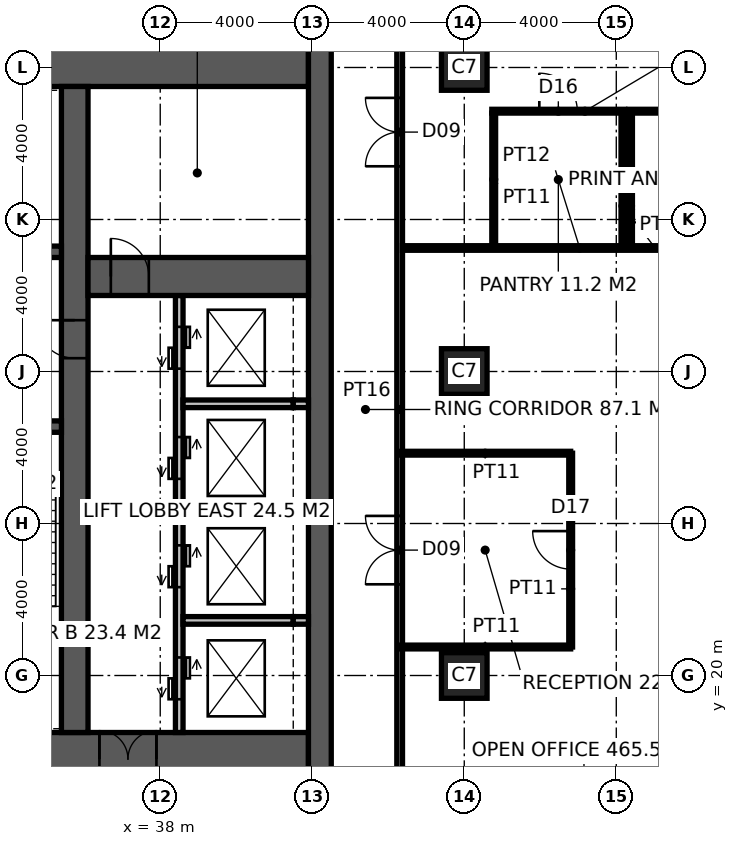
"""IFC4 building model, lengths in metres.
Left out: names, types, materials, properties, quantities, classifications, styles, units other than length and angle.
Written with IfcOpenShell. Run it as: python <this file> out.ifc"""

import sys

from ifc_helpers import new_model, si_unit, direction, frame, frame_2d, origin, origin_2d, place, context, subcontext, project, spatial, rectangle, hollow_rectangle, extrude, element, fill, save


model = new_model("IFC4")
c1 = context("Model", 3, precision=1e-05, world=origin(), true_north=direction((0.0, 1.0)))
c2 = subcontext(c1, "Body", "Model", "MODEL_VIEW")
j1 = project(units=[si_unit("LENGTHUNIT", "METRE"), si_unit("PLANEANGLEUNIT", "RADIAN")], contexts=[c1])
p1 = place(None, origin())
s1 = spatial("IfcSite", under=j1, at=p1, CompositionType="ELEMENT")
p2 = place(p1, origin())
s2 = spatial("IfcBuilding", under=s1, at=p2, CompositionType="ELEMENT")
p3 = place(p2, frame((0.0, 0.0, 47.0)))
s3 = spatial("IfcBuildingStorey", under=s2, at=p3, CompositionType="ELEMENT", Elevation=47.0)
for number, where, z_axis, x_axis in (
    (1, (46.0, 20.0, 0.0), (0.0, 0.0, 1.0), (1.0, 0.0, 0.0)),
    (2, (46.0, 28.0, 0.0), (0.0, 0.0, 1.0), (1.0, 0.0, 0.0)),
    (3, (46.0, 36.0, 0.0), (0.0, 0.0, 1.0), (1.0, 0.0, 0.0)),
):
    element("IfcColumn", number, at=place(p3, frame(where, z_axis=z_axis, x_axis=x_axis)), inside=s3, PredefinedType="COLUMN", context=c2, shape_type="SweptSolid", body=[
        extrude(hollow_rectangle(XDim=1.2, YDim=1.2, WallThickness=0.1, at=origin_2d()), origin(), (0.0, 0.0, 1.0), 4.0),
    ])
p4 = place(p3, frame((18.5, 17.8, -0.15), z_axis=(0.0, 0.0, 1.0), x_axis=(1.0, 0.0, 0.0)))
e4 = element("IfcWall", 4, at=p4, inside=s3, PredefinedType="SHEAR", context=c2, shape_type="SweptSolid", body=[
    extrude(rectangle(XDim=23.4, YDim=1.4, at=frame_2d((11.7, 0.0))), origin(), (0.0, 0.0, 1.0), 4.0),
])
p5 = place(p4, frame((3.45, 0.0, 0.15)))
e5 = element("IfcOpeningElement", 5, at=p5, cuts=e4, PredefinedType="OPENING", context=c2, shape_type="SweptSolid", body=[
    extrude(rectangle(XDim=1.5, YDim=2.4, at=frame_2d((0.75, 1.2))), frame((0.0, 0.71, 0.0), z_axis=(0.0, -1.0, 0.0), x_axis=(1.0, 0.0, 0.0)), (0.0, 0.0, 1.0), 1.42),
])
p6 = place(p4, frame((17.9, 0.0, 0.15)))
e6 = element("IfcOpeningElement", 6, at=p6, cuts=e4, PredefinedType="OPENING", context=c2, shape_type="SweptSolid", body=[
    extrude(rectangle(XDim=1.5, YDim=2.4, at=frame_2d((0.75, 1.2))), frame((0.0, 0.71, 0.0), z_axis=(0.0, -1.0, 0.0), x_axis=(1.0, 0.0, 0.0)), (0.0, 0.0, 1.0), 1.42),
])
p7 = place(p4, frame((0.9, 0.0, 0.15)))
e7 = element("IfcOpeningElement", 7, at=p7, cuts=e4, PredefinedType="OPENING", context=c2, shape_type="SweptSolid", body=[
    extrude(rectangle(XDim=1.0, YDim=2.2, at=frame_2d((0.5, 1.1))), frame((0.0, 0.71, 0.0), z_axis=(0.0, -1.0, 0.0), x_axis=(1.0, 0.0, 0.0)), (0.0, 0.0, 1.0), 1.42),
])
p8 = place(p3, frame((18.5, 36.2, -0.15), z_axis=(0.0, 0.0, 1.0), x_axis=(1.0, 0.0, 0.0)))
e8 = element("IfcWall", 8, at=p8, inside=s3, PredefinedType="SHEAR", context=c2, shape_type="SweptSolid", body=[
    extrude(rectangle(XDim=23.4, YDim=1.4, at=frame_2d((11.7, 0.0))), origin(), (0.0, 0.0, 1.0), 4.0),
])
p9 = place(p3, frame((42.2, 17.1, -0.15), z_axis=(0.0, 0.0, 1.0), x_axis=(0.0, 1.0, 0.0)))
e9 = element("IfcWall", 9, at=p9, inside=s3, PredefinedType="SHEAR", context=c2, shape_type="SweptSolid", body=[
    extrude(rectangle(XDim=19.8, YDim=0.6, at=frame_2d((9.9, 0.0))), origin(), (0.0, 0.0, 1.0), 4.0),
])
p10 = place(p3, frame((35.75, 18.5, -0.15), z_axis=(0.0, 0.0, 1.0), x_axis=(0.0, 1.0, 0.0)))
e10 = element("IfcWall", 10, at=p10, inside=s3, PredefinedType="SHEAR", context=c2, shape_type="SweptSolid", body=[
    extrude(rectangle(XDim=17.0, YDim=0.7, at=frame_2d((8.5, 0.0))), origin(), (0.0, 0.0, 1.0), 4.0),
])
p11 = place(p10, frame((9.85, 0.0, 0.15)))
e11 = element("IfcOpeningElement", 11, at=p11, cuts=e10, PredefinedType="OPENING", context=c2, shape_type="SweptSolid", body=[
    extrude(rectangle(XDim=1.0, YDim=2.2, at=frame_2d((0.5, 1.1))), frame((0.0, 0.36, 0.0), z_axis=(0.0, -1.0, 0.0), x_axis=(1.0, 0.0, 0.0)), (0.0, 0.0, 1.0), 0.72),
])
p12 = place(p3, frame((24.15, 26.55, -0.15), z_axis=(0.0, 0.0, 1.0), x_axis=(1.0, 0.0, 0.0)))
e12 = element("IfcWall", 12, at=p12, inside=s3, PredefinedType="SHEAR", context=c2, shape_type="SweptSolid", body=[
    extrude(rectangle(XDim=11.25, YDim=0.3, at=frame_2d((5.625, 0.0))), origin(), (0.0, 0.0, 1.0), 4.0),
])
p13 = place(p12, frame((9.25, 0.0, 0.15)))
e13 = element("IfcOpeningElement", 13, at=p13, cuts=e12, PredefinedType="OPENING", context=c2, shape_type="SweptSolid", body=[
    extrude(rectangle(XDim=1.0, YDim=2.2, at=frame_2d((0.5, 1.1))), frame((0.0, 0.16, 0.0), z_axis=(0.0, -1.0, 0.0), x_axis=(1.0, 0.0, 0.0)), (0.0, 0.0, 1.0), 0.32),
])
p14 = place(p12, frame((4.9, 0.0, 0.15)))
e14 = element("IfcOpeningElement", 14, at=p14, cuts=e12, PredefinedType="OPENING", context=c2, shape_type="SweptSolid", body=[
    extrude(rectangle(XDim=1.5, YDim=2.4, at=frame_2d((0.75, 1.2))), frame((0.0, 0.16, 0.0), z_axis=(0.0, -1.0, 0.0), x_axis=(1.0, 0.0, 0.0)), (0.0, 0.0, 1.0), 0.32),
])
p15 = place(p3, frame((24.15, 31.15, -0.15), z_axis=(0.0, 0.0, 1.0), x_axis=(1.0, 0.0, 0.0)))
e15 = element("IfcWall", 15, at=p15, inside=s3, PredefinedType="SHEAR", context=c2, shape_type="SweptSolid", body=[
    extrude(rectangle(XDim=11.25, YDim=0.3, at=frame_2d((5.625, 0.0))), origin(), (0.0, 0.0, 1.0), 4.0),
])
p16 = place(p15, frame((7.25, 0.0, 0.15)))
e16 = element("IfcOpeningElement", 16, at=p16, cuts=e15, PredefinedType="OPENING", context=c2, shape_type="SweptSolid", body=[
    extrude(rectangle(XDim=1.4, YDim=2.4, at=frame_2d((0.7, 1.2))), frame((0.0, 0.16, 0.0), z_axis=(0.0, -1.0, 0.0), x_axis=(1.0, 0.0, 0.0)), (0.0, 0.0, 1.0), 0.32),
])
p17 = place(p3, frame((38.5, 18.5, -0.15), z_axis=(0.0, 0.0, 1.0), x_axis=(0.0, 1.0, 0.0)))
e17 = element("IfcWall", 17, at=p17, inside=s3, PredefinedType="SOLIDWALL", context=c2, shape_type="SweptSolid", body=[
    extrude(rectangle(XDim=11.5, YDim=0.2, at=frame_2d((5.75, 0.0))), origin(), (0.0, 0.0, 1.0), 4.0),
])
p18 = place(p17, frame((0.875, 0.0, 0.15)))
e18 = element("IfcOpeningElement", 18, at=p18, cuts=e17, PredefinedType="OPENING", context=c2, shape_type="SweptSolid", body=[
    extrude(rectangle(XDim=1.1, YDim=2.2, at=frame_2d((0.55, 1.1))), frame((0.0, 0.11, 0.0), z_axis=(0.0, -1.0, 0.0), x_axis=(1.0, 0.0, 0.0)), (0.0, 0.0, 1.0), 0.22),
])
p19 = place(p17, frame((3.825, 0.0, 0.15)))
e19 = element("IfcOpeningElement", 19, at=p19, cuts=e17, PredefinedType="OPENING", context=c2, shape_type="SweptSolid", body=[
    extrude(rectangle(XDim=1.1, YDim=2.2, at=frame_2d((0.55, 1.1))), frame((0.0, 0.11, 0.0), z_axis=(0.0, -1.0, 0.0), x_axis=(1.0, 0.0, 0.0)), (0.0, 0.0, 1.0), 0.22),
])
p20 = place(p17, frame((6.675, 0.0, 0.15)))
e20 = element("IfcOpeningElement", 20, at=p20, cuts=e17, PredefinedType="OPENING", context=c2, shape_type="SweptSolid", body=[
    extrude(rectangle(XDim=1.1, YDim=2.2, at=frame_2d((0.55, 1.1))), frame((0.0, 0.11, 0.0), z_axis=(0.0, -1.0, 0.0), x_axis=(1.0, 0.0, 0.0)), (0.0, 0.0, 1.0), 0.22),
])
p21 = place(p17, frame((9.575, 0.0, 0.15)))
e21 = element("IfcOpeningElement", 21, at=p21, cuts=e17, PredefinedType="OPENING", context=c2, shape_type="SweptSolid", body=[
    extrude(rectangle(XDim=1.1, YDim=2.2, at=frame_2d((0.55, 1.1))), frame((0.0, 0.11, 0.0), z_axis=(0.0, -1.0, 0.0), x_axis=(1.0, 0.0, 0.0)), (0.0, 0.0, 1.0), 0.22),
])
p22 = place(p3, frame((36.1, 30.5, -0.15), z_axis=(0.0, 0.0, 1.0), x_axis=(1.0, 0.0, 0.0)))
e22 = element("IfcWall", 22, at=p22, inside=s3, PredefinedType="SHEAR", context=c2, shape_type="SweptSolid", body=[
    extrude(rectangle(XDim=5.8, YDim=1.0, at=frame_2d((2.9, 0.0))), origin(), (0.0, 0.0, 1.0), 4.0),
])
p23 = place(p22, frame((0.6, 0.0, 0.15)))
e23 = element("IfcOpeningElement", 23, at=p23, cuts=e22, PredefinedType="OPENING", context=c2, shape_type="SweptSolid", body=[
    extrude(rectangle(XDim=1.0, YDim=2.2, at=frame_2d((0.5, 1.1))), frame((0.0, 0.51, 0.0), z_axis=(0.0, -1.0, 0.0), x_axis=(1.0, 0.0, 0.0)), (0.0, 0.0, 1.0), 1.02),
])
p24 = place(p3, frame((38.6, 21.45, -0.15), z_axis=(0.0, 0.0, 1.0), x_axis=(1.0, 0.0, 0.0)))
e24 = element("IfcWall", 24, at=p24, inside=s3, PredefinedType="SOLIDWALL", context=c2, shape_type="SweptSolid", body=[
    extrude(rectangle(XDim=2.9, YDim=0.2, at=frame_2d((1.45, 0.0))), origin(), (0.0, 0.0, 1.0), 4.0),
])
p25 = place(p3, frame((41.5, 21.45, -0.15), z_axis=(0.0, 0.0, 1.0), x_axis=(1.0, 0.0, 0.0)))
e25 = element("IfcWall", 25, at=p25, inside=s3, PredefinedType="SOLIDWALL", context=c2, shape_type="SweptSolid", body=[
    extrude(rectangle(XDim=0.4, YDim=0.2, at=frame_2d((0.2, 0.0))), origin(), (0.0, 0.0, 1.0), 4.0),
])
p26 = place(p3, frame((38.6, 24.3, -0.15), z_axis=(0.0, 0.0, 1.0), x_axis=(1.0, 0.0, 0.0)))
e26 = element("IfcWall", 26, at=p26, inside=s3, PredefinedType="SOLIDWALL", context=c2, shape_type="SweptSolid", body=[
    extrude(rectangle(XDim=2.9, YDim=0.2, at=frame_2d((1.45, 0.0))), origin(), (0.0, 0.0, 1.0), 4.0),
])
p27 = place(p3, frame((41.5, 24.3, -0.15), z_axis=(0.0, 0.0, 1.0), x_axis=(1.0, 0.0, 0.0)))
e27 = element("IfcWall", 27, at=p27, inside=s3, PredefinedType="SOLIDWALL", context=c2, shape_type="SweptSolid", body=[
    extrude(rectangle(XDim=0.4, YDim=0.2, at=frame_2d((0.2, 0.0))), origin(), (0.0, 0.0, 1.0), 4.0),
])
p28 = place(p3, frame((38.6, 27.15, -0.15), z_axis=(0.0, 0.0, 1.0), x_axis=(1.0, 0.0, 0.0)))
e28 = element("IfcWall", 28, at=p28, inside=s3, PredefinedType="SOLIDWALL", context=c2, shape_type="SweptSolid", body=[
    extrude(rectangle(XDim=2.9, YDim=0.2, at=frame_2d((1.45, 0.0))), origin(), (0.0, 0.0, 1.0), 4.0),
])
p29 = place(p3, frame((41.5, 27.15, -0.15), z_axis=(0.0, 0.0, 1.0), x_axis=(1.0, 0.0, 0.0)))
e29 = element("IfcWall", 29, at=p29, inside=s3, PredefinedType="SOLIDWALL", context=c2, shape_type="SweptSolid", body=[
    extrude(rectangle(XDim=0.4, YDim=0.2, at=frame_2d((0.2, 0.0))), origin(), (0.0, 0.0, 1.0), 4.0),
])
p30 = place(p3, frame((44.3, 15.225, 0.0), z_axis=(0.0, 0.0, 1.0), x_axis=(0.0, 1.0, 0.0)))
e30 = element("IfcWall", 30, at=p30, inside=s3, PredefinedType="PARTITIONING", context=c2, shape_type="SweptSolid", body=[
    extrude(rectangle(XDim=23.55, YDim=0.15, at=frame_2d((11.775, 0.0))), origin(), (0.0, 0.0, 1.0), 3.85),
])
p31 = place(p30, frame((7.175, 0.0, 0.0)))
e31 = element("IfcOpeningElement", 31, at=p31, cuts=e30, PredefinedType="OPENING", context=c2, shape_type="SweptSolid", body=[
    extrude(rectangle(XDim=1.8, YDim=2.4, at=frame_2d((0.9, 1.2))), frame((0.0, 0.085, 0.0), z_axis=(0.0, -1.0, 0.0), x_axis=(1.0, 0.0, 0.0)), (0.0, 0.0, 1.0), 0.17),
])
p32 = place(p30, frame((18.175, 0.0, 0.0)))
e32 = element("IfcOpeningElement", 32, at=p32, cuts=e30, PredefinedType="OPENING", context=c2, shape_type="SweptSolid", body=[
    extrude(rectangle(XDim=1.8, YDim=2.4, at=frame_2d((0.9, 1.2))), frame((0.0, 0.085, 0.0), z_axis=(0.0, -1.0, 0.0), x_axis=(1.0, 0.0, 0.0)), (0.0, 0.0, 1.0), 0.17),
])
p33 = place(p3, frame((44.375, 31.25, 0.0), z_axis=(0.0, 0.0, 1.0), x_axis=(1.0, 0.0, 0.0)))
e33 = element("IfcWall", 33, at=p33, inside=s3, PredefinedType="PARTITIONING", context=c2, shape_type="SweptSolid", body=[
    extrude(rectangle(XDim=9.325, YDim=0.12, at=frame_2d((4.663, 0.0))), origin(), (0.0, 0.0, 1.0), 3.85),
])
p34 = place(p3, frame((46.725, 34.85, 0.0), z_axis=(0.0, 0.0, 1.0), x_axis=(1.0, 0.0, 0.0)))
e34 = element("IfcWall", 34, at=p34, inside=s3, PredefinedType="PARTITIONING", context=c2, shape_type="SweptSolid", body=[
    extrude(rectangle(XDim=3.5, YDim=0.1, at=frame_2d((1.75, 0.0))), origin(), (0.0, 0.0, 1.0), 3.85),
])
p35 = place(p34, frame((1.25, 0.0, 0.0)))
e35 = element("IfcOpeningElement", 35, at=p35, cuts=e34, PredefinedType="OPENING", context=c2, shape_type="SweptSolid", body=[
    extrude(rectangle(XDim=1.0, YDim=2.2, at=frame_2d((0.5, 1.1))), frame((0.0, 0.06, 0.0), z_axis=(0.0, -1.0, 0.0), x_axis=(1.0, 0.0, 0.0)), (0.0, 0.0, 1.0), 0.12),
])
p36 = place(p3, frame((50.325, 34.85, 0.0), z_axis=(0.0, 0.0, 1.0), x_axis=(1.0, 0.0, 0.0)))
e36 = element("IfcWall", 36, at=p36, inside=s3, PredefinedType="PARTITIONING", context=c2, shape_type="SweptSolid", body=[
    extrude(rectangle(XDim=2.75, YDim=0.1, at=frame_2d((1.375, 0.0))), origin(), (0.0, 0.0, 1.0), 3.85),
])
p37 = place(p36, frame((0.875, 0.0, 0.0)))
e37 = element("IfcOpeningElement", 37, at=p37, cuts=e36, PredefinedType="OPENING", context=c2, shape_type="SweptSolid", body=[
    extrude(rectangle(XDim=1.0, YDim=2.2, at=frame_2d((0.5, 1.1))), frame((0.0, 0.06, 0.0), z_axis=(0.0, -1.0, 0.0), x_axis=(1.0, 0.0, 0.0)), (0.0, 0.0, 1.0), 0.12),
])
for number, where, z_axis, x_axis in (
    (38, (46.775, 31.31, 0.0), (0.0, 0.0, 1.0), (0.0, 1.0, 0.0)),
    (39, (50.175, 31.31, 0.0), (0.0, 0.0, 1.0), (0.0, 1.0, 0.0)),
    (40, (50.375, 31.31, 0.0), (0.0, 0.0, 1.0), (0.0, 1.0, 0.0)),
):
    element("IfcWall", number, at=place(p3, frame(where, z_axis=z_axis, x_axis=x_axis)), inside=s3, PredefinedType="PARTITIONING", context=c2, shape_type="SweptSolid", body=[
        extrude(rectangle(XDim=3.49, YDim=0.1, at=frame_2d((1.745, 0.0))), origin(), (0.0, 0.0, 1.0), 3.85),
    ])
p38 = place(p3, frame((44.3, 20.75, 0.0), z_axis=(0.0, 0.0, 1.0), x_axis=(1.0, 0.0, 0.0)))
e41 = element("IfcWall", 41, at=p38, inside=s3, PredefinedType="PARTITIONING", context=c2, shape_type="SweptSolid", body=[
    extrude(rectangle(XDim=4.5, YDim=0.1, at=frame_2d((2.25, 0.0))), origin(), (0.0, 0.0, 1.0), 3.85),
])
p39 = place(p3, frame((48.8, 20.75, 0.0), z_axis=(0.0, 0.0, 1.0), x_axis=(0.0, 1.0, 0.0)))
e42 = element("IfcWall", 42, at=p39, inside=s3, PredefinedType="PARTITIONING", context=c2, shape_type="SweptSolid", body=[
    extrude(rectangle(XDim=5.1, YDim=0.1, at=frame_2d((2.55, 0.0))), origin(), (0.0, 0.0, 1.0), 3.85),
])
p40 = place(p39, frame((2.05, 0.0, 0.0)))
e43 = element("IfcOpeningElement", 43, at=p40, cuts=e42, PredefinedType="OPENING", context=c2, shape_type="SweptSolid", body=[
    extrude(rectangle(XDim=1.0, YDim=2.2, at=frame_2d((0.5, 1.1))), frame((0.0, 0.06, 0.0), z_axis=(0.0, -1.0, 0.0), x_axis=(1.0, 0.0, 0.0)), (0.0, 0.0, 1.0), 0.12),
])
p41 = place(p3, frame((48.8, 25.85, 0.0), z_axis=(0.0, 0.0, 1.0), x_axis=(-1.0, 0.0, 0.0)))
e44 = element("IfcWall", 44, at=p41, inside=s3, PredefinedType="PARTITIONING", context=c2, shape_type="SweptSolid", body=[
    extrude(rectangle(XDim=4.5, YDim=0.1, at=frame_2d((2.25, 0.0))), origin(), (0.0, 0.0, 1.0), 3.85),
])
p42 = place(p11, origin())
e45 = element("IfcDoor", 45, at=p42, inside=s3, OperationType="SINGLE_SWING_RIGHT", PredefinedType="DOOR", context=c2, shape_type="SweptSolid", body=[
    extrude(rectangle(XDim=1.0, YDim=2.2, at=frame_2d((0.5, 1.1))), frame((0.0, 0.025, 0.0), z_axis=(0.0, -1.0, 0.0), x_axis=(1.0, 0.0, 0.0)), (0.0, 0.0, 1.0), 0.05),
])
fill(e11, e45)
p43 = place(p6, origin())
e46 = element("IfcDoor", 46, at=p43, inside=s3, OperationType="DOUBLE_DOOR_DOUBLE_SWING", PredefinedType="DOOR", context=c2, shape_type="SweptSolid", body=[
    extrude(rectangle(XDim=1.5, YDim=2.4, at=frame_2d((0.75, 1.2))), frame((0.0, 0.025, 0.0), z_axis=(0.0, -1.0, 0.0), x_axis=(1.0, 0.0, 0.0)), (0.0, 0.0, 1.0), 0.05),
])
fill(e6, e46)
p44 = place(p23, origin())
e47 = element("IfcDoor", 47, at=p44, inside=s3, OperationType="SINGLE_SWING_LEFT", PredefinedType="DOOR", context=c2, shape_type="SweptSolid", body=[
    extrude(rectangle(XDim=1.0, YDim=2.2, at=frame_2d((0.5, 1.1))), frame((0.0, 0.025, 0.0), z_axis=(0.0, -1.0, 0.0), x_axis=(1.0, 0.0, 0.0)), (0.0, 0.0, 1.0), 0.05),
])
fill(e23, e47)
p45 = place(p31, origin())
e48 = element("IfcDoor", 48, at=p45, inside=s3, OperationType="DOUBLE_DOOR_DOUBLE_SWING", PredefinedType="DOOR", context=c2, shape_type="SweptSolid", body=[
    extrude(rectangle(XDim=1.8, YDim=2.4, at=frame_2d((0.9, 1.2))), frame((0.0, 0.025, 0.0), z_axis=(0.0, -1.0, 0.0), x_axis=(1.0, 0.0, 0.0)), (0.0, 0.0, 1.0), 0.05),
])
fill(e31, e48)
p46 = place(p32, origin())
e49 = element("IfcDoor", 49, at=p46, inside=s3, OperationType="DOUBLE_DOOR_DOUBLE_SWING", PredefinedType="DOOR", context=c2, shape_type="SweptSolid", body=[
    extrude(rectangle(XDim=1.8, YDim=2.4, at=frame_2d((0.9, 1.2))), frame((0.0, 0.025, 0.0), z_axis=(0.0, -1.0, 0.0), x_axis=(1.0, 0.0, 0.0)), (0.0, 0.0, 1.0), 0.05),
])
fill(e32, e49)
p47 = place(p35, origin())
e50 = element("IfcDoor", 50, at=p47, inside=s3, OperationType="SINGLE_SWING_LEFT", PredefinedType="DOOR", context=c2, shape_type="SweptSolid", body=[
    extrude(rectangle(XDim=1.0, YDim=2.2, at=frame_2d((0.5, 1.1))), frame((0.0, 0.025, 0.0), z_axis=(0.0, -1.0, 0.0), x_axis=(1.0, 0.0, 0.0)), (0.0, 0.0, 1.0), 0.05),
])
fill(e35, e50)
p48 = place(p40, origin())
e51 = element("IfcDoor", 51, at=p48, inside=s3, OperationType="SINGLE_SWING_RIGHT", PredefinedType="DOOR", context=c2, shape_type="SweptSolid", body=[
    extrude(rectangle(XDim=1.0, YDim=2.2, at=frame_2d((0.5, 1.1))), frame((0.0, 0.025, 0.0), z_axis=(0.0, -1.0, 0.0), x_axis=(1.0, 0.0, 0.0)), (0.0, 0.0, 1.0), 0.05),
])
fill(e43, e51)
p49 = place(p18, origin())
e52 = element("IfcDoor", 52, at=p49, inside=s3, OperationType="DOUBLE_DOOR_SLIDING", PredefinedType="DOOR", context=c2, shape_type="SweptSolid", body=[
    extrude(rectangle(XDim=1.1, YDim=2.2, at=frame_2d((0.55, 1.1))), frame((0.0, 0.025, 0.0), z_axis=(0.0, -1.0, 0.0), x_axis=(1.0, 0.0, 0.0)), (0.0, 0.0, 1.0), 0.05),
])
fill(e18, e52)
p50 = place(p19, origin())
e53 = element("IfcDoor", 53, at=p50, inside=s3, OperationType="DOUBLE_DOOR_SLIDING", PredefinedType="DOOR", context=c2, shape_type="SweptSolid", body=[
    extrude(rectangle(XDim=1.1, YDim=2.2, at=frame_2d((0.55, 1.1))), frame((0.0, 0.025, 0.0), z_axis=(0.0, -1.0, 0.0), x_axis=(1.0, 0.0, 0.0)), (0.0, 0.0, 1.0), 0.05),
])
fill(e19, e53)
p51 = place(p20, origin())
e54 = element("IfcDoor", 54, at=p51, inside=s3, OperationType="DOUBLE_DOOR_SLIDING", PredefinedType="DOOR", context=c2, shape_type="SweptSolid", body=[
    extrude(rectangle(XDim=1.1, YDim=2.2, at=frame_2d((0.55, 1.1))), frame((0.0, 0.025, 0.0), z_axis=(0.0, -1.0, 0.0), x_axis=(1.0, 0.0, 0.0)), (0.0, 0.0, 1.0), 0.05),
])
fill(e20, e54)
p52 = place(p21, origin())
e55 = element("IfcDoor", 55, at=p52, inside=s3, OperationType="DOUBLE_DOOR_SLIDING", PredefinedType="DOOR", context=c2, shape_type="SweptSolid", body=[
    extrude(rectangle(XDim=1.1, YDim=2.2, at=frame_2d((0.55, 1.1))), frame((0.0, 0.025, 0.0), z_axis=(0.0, -1.0, 0.0), x_axis=(1.0, 0.0, 0.0)), (0.0, 0.0, 1.0), 0.05),
])
fill(e21, e55)
save(model, sys.argv[1])
